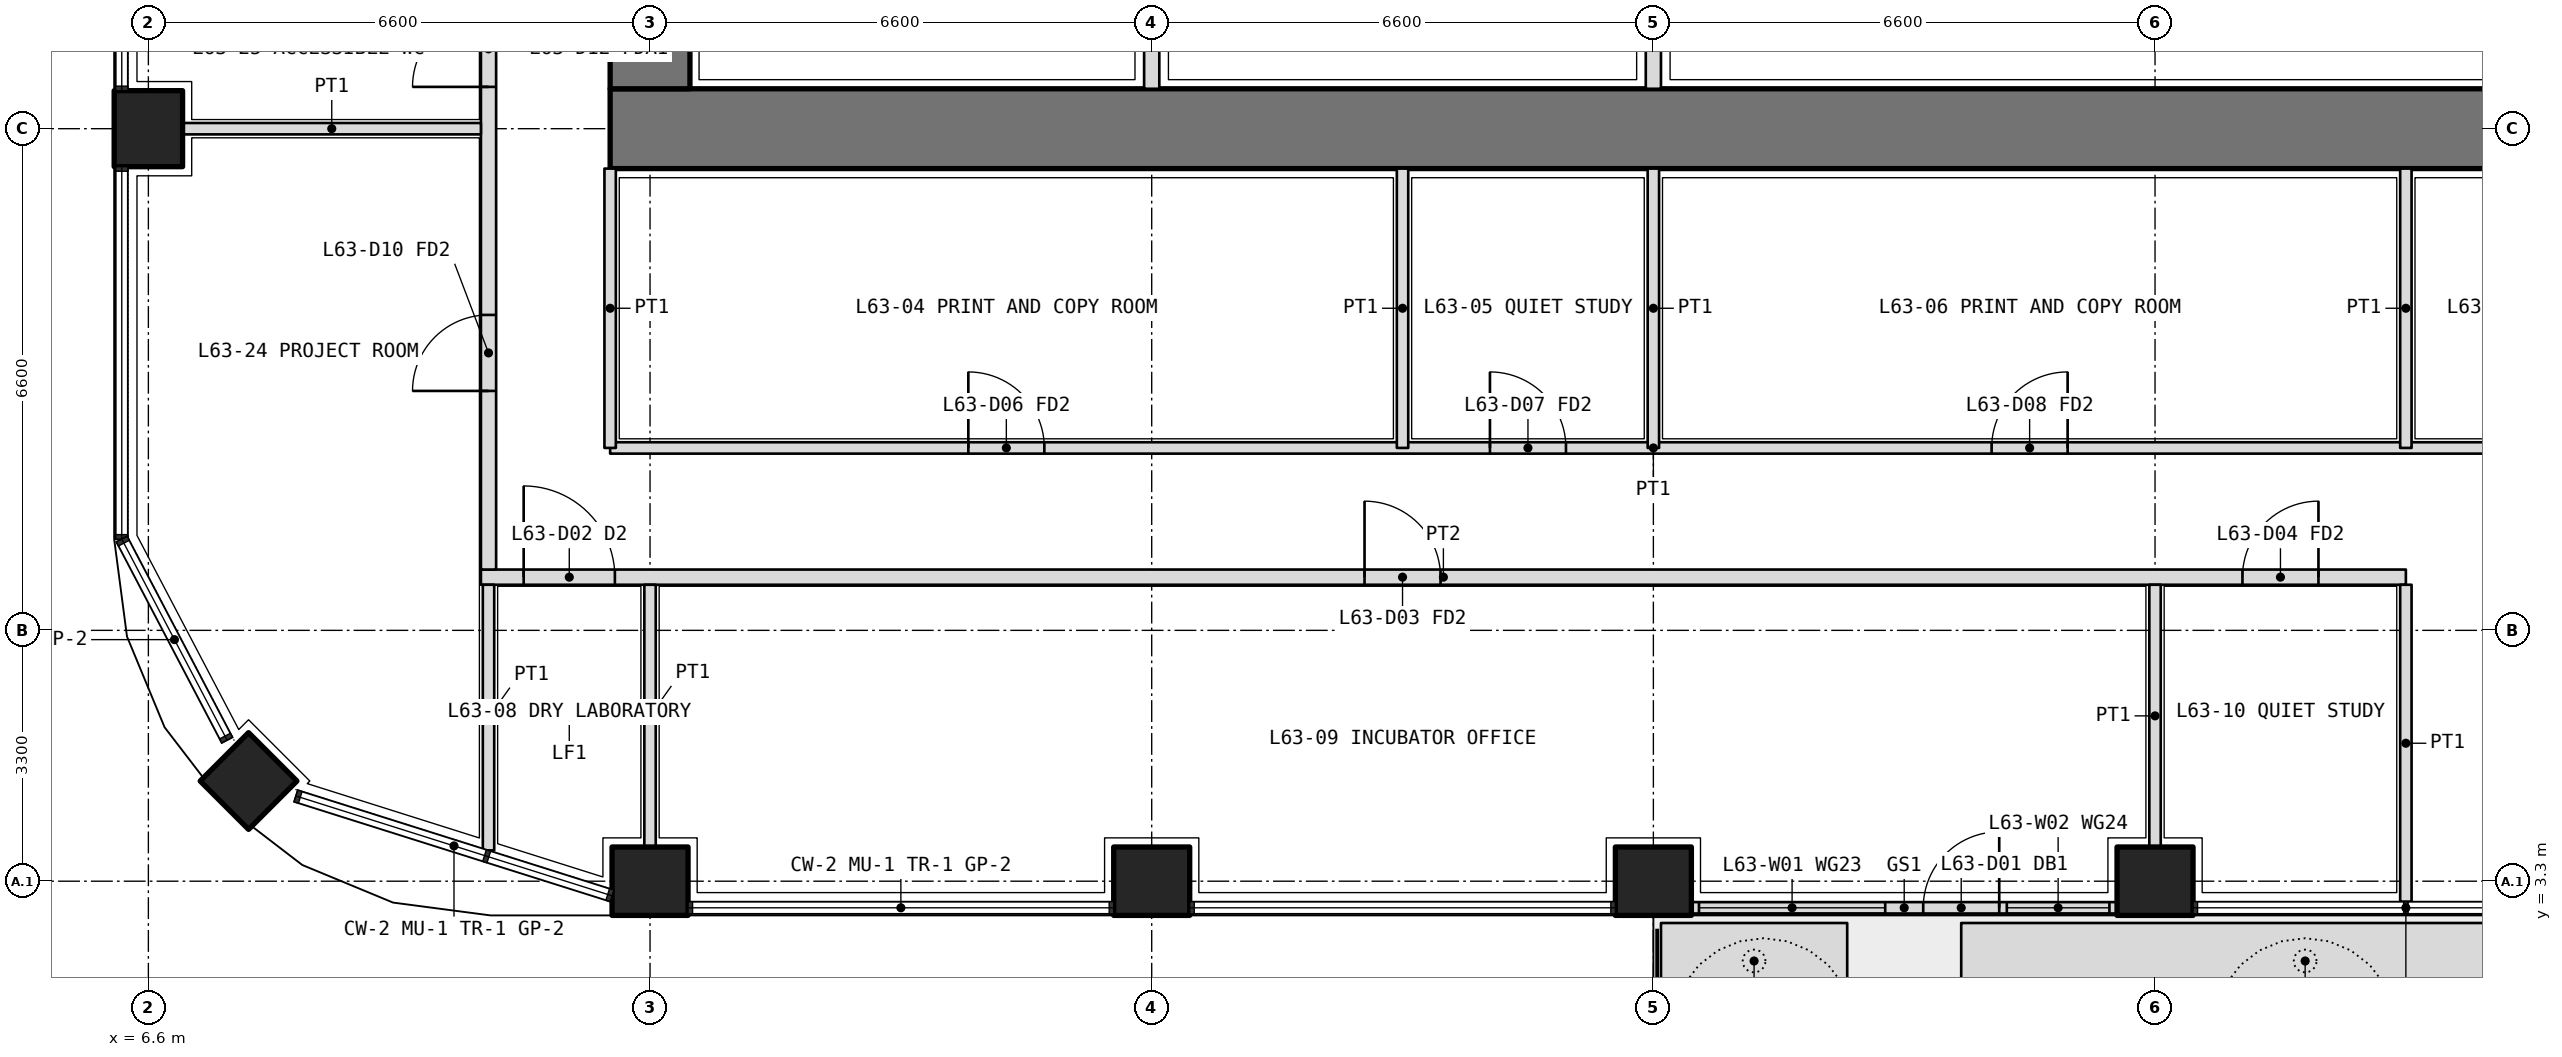
"""IFC4 building model, lengths in metres.
Left out: names, types, materials, properties, quantities, classifications, styles, units other than length and angle.
Written with IfcOpenShell. Run it as: python <this file> out.ifc"""

import sys

from ifc_helpers import new_model, si_unit, direction, frame, frame_2d, origin, origin_2d, place, context, subcontext, project, spatial, polyline, rectangle, outline, extrude, element, fill, save


model = new_model("IFC4")
c1 = context("Model", 3, precision=1e-05, world=origin(), true_north=direction((0.0, 1.0)))
c2 = subcontext(c1, "Body", "Model", "MODEL_VIEW")
j1 = project(units=[si_unit("LENGTHUNIT", "METRE"), si_unit("PLANEANGLEUNIT", "RADIAN")], contexts=[c1])
p1 = place(None, origin())
s1 = spatial("IfcSite", under=j1, at=p1, CompositionType="ELEMENT")
p2 = place(p1, origin())
s2 = spatial("IfcBuilding", under=s1, at=p2, CompositionType="ELEMENT")
p3 = place(p2, frame((0.0, 0.0, 275.4)))
s3 = spatial("IfcBuildingStorey", under=s2, at=p3, CompositionType="ELEMENT", Elevation=275.4)
p4 = place(p3, frame((7.918, 4.618, 0.0), z_axis=(0.0, 0.0, 1.0), x_axis=(0.707106781187, 0.707106781187, 0.0)))
e1 = element("IfcColumn", 1, at=p4, inside=s3, PredefinedType="COLUMN", context=c2, shape_type="SweptSolid", body=[
    extrude(rectangle(XDim=0.9, YDim=0.9, at=origin_2d()), origin(), (0.0, 0.0, 1.0), 4.2),
])
for number, where, z_axis, x_axis in (
    (2, (13.2, 3.3, 0.0), (0.0, 0.0, 1.0), (1.0, 0.0, 0.0)),
    (3, (19.8, 3.3, 0.0), (0.0, 0.0, 1.0), (1.0, 0.0, 0.0)),
    (4, (26.4, 3.3, 0.0), (0.0, 0.0, 1.0), (1.0, 0.0, 0.0)),
    (5, (33.0, 3.3, 0.0), (0.0, 0.0, 1.0), (1.0, 0.0, 0.0)),
    (6, (6.6, 13.2, 0.0), (0.0, 0.0, 1.0), (0.0, 1.0, 0.0)),
):
    element("IfcColumn", number, at=place(p3, frame(where, z_axis=z_axis, x_axis=x_axis)), inside=s3, PredefinedType="COLUMN", context=c2, shape_type="SweptSolid", body=[
        extrude(rectangle(XDim=1.0, YDim=0.9, at=origin_2d()), origin(), (0.0, 0.0, 1.0), 4.2),
    ])
p5 = place(p3, origin())
e7 = element("IfcWall", 7, at=p5, inside=s3, PredefinedType="USERDEFINED", context=c2, shape_type="SweptSolid", body=[
    extrude(outline(polyline([(26.5, 1.75), (28.95, 1.75), (28.95, 2.75), (26.5, 2.75), (26.5, 1.75)]), holes=[polyline([(26.65, 1.9), (28.8, 1.9), (28.8, 2.6), (26.65, 2.6), (26.65, 1.9)])]), origin(), (0.0, 0.0, 1.0), 1.05),
])
p6 = place(p3, origin())
e8 = element("IfcWall", 8, at=p6, inside=s3, PredefinedType="USERDEFINED", context=c2, shape_type="SweptSolid", body=[
    extrude(outline(polyline([(30.45, 1.75), (39.5, 1.75), (39.5, 2.75), (30.45, 2.75), (30.45, 1.75)]), holes=[polyline([(30.6, 1.9), (39.35, 1.9), (39.35, 2.6), (30.6, 2.6), (30.6, 1.9)])]), origin(), (0.0, 0.0, 1.0), 1.05),
])
p7 = place(p3, frame((26.9, 2.95, 0.0), z_axis=(0.0, 0.0, 1.0), x_axis=(1.0, 0.0, 0.0)))
e9 = element("IfcWall", 9, at=p7, inside=s3, PredefinedType="SOLIDWALL", context=c2, shape_type="SweptSolid", body=[
    extrude(rectangle(XDim=5.6, YDim=0.15, at=frame_2d((2.8, 0.0))), origin(), (0.0, 0.0, 1.0), 2.7),
])
p8 = place(p7, frame((3.05, 0.0, 0.0)))
e10 = element("IfcOpeningElement", 10, at=p8, cuts=e9, PredefinedType="OPENING", context=c2, shape_type="SweptSolid", body=[
    extrude(rectangle(XDim=1.0, YDim=2.4, at=frame_2d((0.5, 1.2))), frame((0.0, 0.085, 0.0), z_axis=(0.0, -1.0, 0.0), x_axis=(1.0, 0.0, 0.0)), (0.0, 0.0, 1.0), 0.17),
])
p9 = place(p7, frame((0.1, 0.0, 0.1)))
e11 = element("IfcOpeningElement", 11, at=p9, cuts=e9, PredefinedType="OPENING", context=c2, shape_type="SweptSolid", body=[
    extrude(rectangle(XDim=2.45, YDim=2.3, at=frame_2d((1.225, 1.15))), frame((0.0, 0.085, 0.0), z_axis=(0.0, -1.0, 0.0), x_axis=(1.0, 0.0, 0.0)), (0.0, 0.0, 1.0), 0.17),
])
p10 = place(p7, frame((4.15, 0.0, 0.1)))
e12 = element("IfcOpeningElement", 12, at=p10, cuts=e9, PredefinedType="OPENING", context=c2, shape_type="SweptSolid", body=[
    extrude(rectangle(XDim=1.35, YDim=2.3, at=frame_2d((0.675, 1.15))), frame((0.0, 0.085, 0.0), z_axis=(0.0, -1.0, 0.0), x_axis=(1.0, 0.0, 0.0)), (0.0, 0.0, 1.0), 0.17),
])
p11 = place(p3, frame((12.675, 13.2, 0.0), z_axis=(0.0, 0.0, 1.0), x_axis=(1.0, 0.0, 0.0)))
e13 = element("IfcWall", 13, at=p11, inside=s3, PredefinedType="SHEAR", context=c2, shape_type="SweptSolid", body=[
    extrude(rectangle(XDim=27.45, YDim=1.05, at=frame_2d((13.725, 0.0))), origin(), (0.0, 0.0, 1.0), 4.2),
])
p12 = place(p3, frame((13.2, 32.475, 0.0), z_axis=(0.0, 0.0, 1.0), x_axis=(0.0, -1.0, 0.0)))
e14 = element("IfcWall", 14, at=p12, inside=s3, PredefinedType="SHEAR", context=c2, shape_type="SweptSolid", body=[
    extrude(rectangle(XDim=18.75, YDim=1.05, at=frame_2d((9.375, 0.0))), origin(), (0.0, 0.0, 1.0), 4.2),
])
p13 = place(p12, frame((14.125, 0.0, 0.0)))
e15 = element("IfcOpeningElement", 15, at=p13, cuts=e14, PredefinedType="OPENING", context=c2, shape_type="SweptSolid", body=[
    extrude(rectangle(XDim=1.6, YDim=2.1, at=frame_2d((0.8, 1.05))), frame((0.0, 0.535, 0.0), z_axis=(0.0, -1.0, 0.0), x_axis=(1.0, 0.0, 0.0)), (0.0, 0.0, 1.0), 1.07),
])
p14 = place(p12, frame((3.325, 0.0, 0.0)))
e16 = element("IfcOpeningElement", 16, at=p14, cuts=e14, PredefinedType="OPENING", context=c2, shape_type="SweptSolid", body=[
    extrude(rectangle(XDim=1.6, YDim=2.1, at=frame_2d((0.8, 1.05))), frame((0.0, 0.535, 0.0), z_axis=(0.0, -1.0, 0.0), x_axis=(1.0, 0.0, 0.0)), (0.0, 0.0, 1.0), 1.07),
])
for number, where, z_axis, x_axis in (
    (17, (19.8, 13.725, 0.0), (0.0, 0.0, 1.0), (0.0, 1.0, 0.0)),
    (18, (26.4, 13.725, 0.0), (0.0, 0.0, 1.0), (0.0, 1.0, 0.0)),
):
    element("IfcWall", number, at=place(p3, frame(where, z_axis=z_axis, x_axis=x_axis)), inside=s3, PredefinedType="PARTITIONING", context=c2, shape_type="SweptSolid", body=[
        extrude(rectangle(XDim=1.975, YDim=0.2, at=frame_2d((0.987, 0.0))), origin(), (0.0, 0.0, 1.0), 4.2),
    ])
p15 = place(p3, frame((12.675, 9.0, 0.0), z_axis=(0.0, 0.0, 1.0), x_axis=(1.0, 0.0, 0.0)))
e19 = element("IfcWall", 19, at=p15, inside=s3, PredefinedType="PARTITIONING", context=c2, shape_type="SweptSolid", body=[
    extrude(rectangle(XDim=27.45, YDim=0.15, at=frame_2d((13.725, 0.0))), origin(), (0.0, 0.0, 1.0), 3.0),
])
p16 = place(p15, frame((4.712, 0.0, 0.0)))
e20 = element("IfcOpeningElement", 20, at=p16, cuts=e19, PredefinedType="OPENING", context=c2, shape_type="SweptSolid", body=[
    extrude(rectangle(XDim=1.0, YDim=2.1, at=frame_2d((0.5, 1.05))), frame((0.0, 0.085, 0.0), z_axis=(0.0, -1.0, 0.0), x_axis=(1.0, 0.0, 0.0)), (0.0, 0.0, 1.0), 0.17),
])
p17 = place(p15, frame((11.575, 0.0, 0.0)))
e21 = element("IfcOpeningElement", 21, at=p17, cuts=e19, PredefinedType="OPENING", context=c2, shape_type="SweptSolid", body=[
    extrude(rectangle(XDim=1.0, YDim=2.1, at=frame_2d((0.5, 1.05))), frame((0.0, 0.085, 0.0), z_axis=(0.0, -1.0, 0.0), x_axis=(1.0, 0.0, 0.0)), (0.0, 0.0, 1.0), 0.17),
])
p18 = place(p15, frame((18.175, 0.0, 0.0)))
e22 = element("IfcOpeningElement", 22, at=p18, cuts=e19, PredefinedType="OPENING", context=c2, shape_type="SweptSolid", body=[
    extrude(rectangle(XDim=1.0, YDim=2.1, at=frame_2d((0.5, 1.05))), frame((0.0, 0.085, 0.0), z_axis=(0.0, -1.0, 0.0), x_axis=(1.0, 0.0, 0.0)), (0.0, 0.0, 1.0), 0.17),
])
p19 = place(p15, frame((25.038, 0.0, 0.0)))
e23 = element("IfcOpeningElement", 23, at=p19, cuts=e19, PredefinedType="OPENING", context=c2, shape_type="SweptSolid", body=[
    extrude(rectangle(XDim=1.0, YDim=2.1, at=frame_2d((0.5, 1.05))), frame((0.0, 0.085, 0.0), z_axis=(0.0, -1.0, 0.0), x_axis=(1.0, 0.0, 0.0)), (0.0, 0.0, 1.0), 0.17),
])
p20 = place(p3, frame((12.675, 12.675, 0.0), z_axis=(0.0, 0.0, 1.0), x_axis=(0.0, -1.0, 0.0)))
e24 = element("IfcWall", 24, at=p20, inside=s3, PredefinedType="PARTITIONING", context=c2, shape_type="SweptSolid", body=[
    extrude(rectangle(XDim=3.675, YDim=0.15, at=frame_2d((1.837, 0.0))), origin(), (0.0, 0.0, 1.0), 3.0),
])
p21 = place(p3, frame((23.1, 12.675, 0.0), z_axis=(0.0, 0.0, 1.0), x_axis=(0.0, -1.0, 0.0)))
e25 = element("IfcWall", 25, at=p21, inside=s3, PredefinedType="PARTITIONING", context=c2, shape_type="SweptSolid", body=[
    extrude(rectangle(XDim=3.675, YDim=0.15, at=frame_2d((1.837, 0.0))), origin(), (0.0, 0.0, 1.0), 3.9),
])
p22 = place(p3, frame((26.4, 12.675, 0.0), z_axis=(0.0, 0.0, 1.0), x_axis=(0.0, -1.0, 0.0)))
e26 = element("IfcWall", 26, at=p22, inside=s3, PredefinedType="PARTITIONING", context=c2, shape_type="SweptSolid", body=[
    extrude(rectangle(XDim=3.675, YDim=0.15, at=frame_2d((1.837, 0.0))), origin(), (0.0, 0.0, 1.0), 3.0),
])
p23 = place(p3, frame((36.3, 12.675, 0.0), z_axis=(0.0, 0.0, 1.0), x_axis=(0.0, -1.0, 0.0)))
e27 = element("IfcWall", 27, at=p23, inside=s3, PredefinedType="PARTITIONING", context=c2, shape_type="SweptSolid", body=[
    extrude(rectangle(XDim=3.675, YDim=0.15, at=frame_2d((1.837, 0.0))), origin(), (0.0, 0.0, 1.0), 3.9),
])
p24 = place(p3, frame((10.975, 7.3, 0.0), z_axis=(0.0, 0.0, 1.0), x_axis=(1.0, 0.0, 0.0)))
e28 = element("IfcWall", 28, at=p24, inside=s3, PredefinedType="PARTITIONING", context=c2, shape_type="SweptSolid", body=[
    extrude(rectangle(XDim=25.325, YDim=0.2, at=frame_2d((12.663, 0.0))), origin(), (0.0, 0.0, 1.0), 3.0),
])
p25 = place(p24, frame((0.562, 0.0, 0.0)))
e29 = element("IfcOpeningElement", 29, at=p25, cuts=e28, PredefinedType="OPENING", context=c2, shape_type="SweptSolid", body=[
    extrude(rectangle(XDim=1.2, YDim=2.1, at=frame_2d((0.6, 1.05))), frame((0.0, 0.11, 0.0), z_axis=(0.0, -1.0, 0.0), x_axis=(1.0, 0.0, 0.0)), (0.0, 0.0, 1.0), 0.22),
])
p26 = place(p24, frame((11.625, 0.0, 0.0)))
e30 = element("IfcOpeningElement", 30, at=p26, cuts=e28, PredefinedType="OPENING", context=c2, shape_type="SweptSolid", body=[
    extrude(rectangle(XDim=1.0, YDim=2.1, at=frame_2d((0.5, 1.05))), frame((0.0, 0.11, 0.0), z_axis=(0.0, -1.0, 0.0), x_axis=(1.0, 0.0, 0.0)), (0.0, 0.0, 1.0), 0.22),
])
p27 = place(p24, frame((23.175, 0.0, 0.0)))
e31 = element("IfcOpeningElement", 31, at=p27, cuts=e28, PredefinedType="OPENING", context=c2, shape_type="SweptSolid", body=[
    extrude(rectangle(XDim=1.0, YDim=2.1, at=frame_2d((0.5, 1.05))), frame((0.0, 0.11, 0.0), z_axis=(0.0, -1.0, 0.0), x_axis=(1.0, 0.0, 0.0)), (0.0, 0.0, 1.0), 0.22),
])
p28 = place(p3, frame((11.075, 7.4, 0.0), z_axis=(0.0, 0.0, 1.0), x_axis=(0.0, 1.0, 0.0)))
e32 = element("IfcWall", 32, at=p28, inside=s3, PredefinedType="PARTITIONING", context=c2, shape_type="SweptSolid", body=[
    extrude(rectangle(XDim=31.4, YDim=0.2, at=frame_2d((15.7, 0.0))), origin(), (0.0, 0.0, 1.0), 3.0),
])
p29 = place(p28, frame((2.35, 0.0, 0.0)))
e33 = element("IfcOpeningElement", 33, at=p29, cuts=e32, PredefinedType="OPENING", context=c2, shape_type="SweptSolid", body=[
    extrude(rectangle(XDim=1.0, YDim=2.1, at=frame_2d((0.5, 1.05))), frame((0.0, 0.11, 0.0), z_axis=(0.0, -1.0, 0.0), x_axis=(1.0, 0.0, 0.0)), (0.0, 0.0, 1.0), 0.22),
])
p30 = place(p28, frame((6.35, 0.0, 0.0)))
e34 = element("IfcOpeningElement", 34, at=p30, cuts=e32, PredefinedType="OPENING", context=c2, shape_type="SweptSolid", body=[
    extrude(rectangle(XDim=1.0, YDim=2.1, at=frame_2d((0.5, 1.05))), frame((0.0, 0.11, 0.0), z_axis=(0.0, -1.0, 0.0), x_axis=(1.0, 0.0, 0.0)), (0.0, 0.0, 1.0), 0.22),
])
p31 = place(p28, frame((9.45, 0.0, 0.0)))
e35 = element("IfcOpeningElement", 35, at=p31, cuts=e32, PredefinedType="OPENING", context=c2, shape_type="SweptSolid", body=[
    extrude(rectangle(XDim=0.9, YDim=2.1, at=frame_2d((0.45, 1.05))), frame((0.0, 0.11, 0.0), z_axis=(0.0, -1.0, 0.0), x_axis=(1.0, 0.0, 0.0)), (0.0, 0.0, 1.0), 0.22),
])
p32 = place(p28, frame((13.35, 0.0, 0.0)))
e36 = element("IfcOpeningElement", 36, at=p32, cuts=e32, PredefinedType="OPENING", context=c2, shape_type="SweptSolid", body=[
    extrude(rectangle(XDim=0.9, YDim=2.1, at=frame_2d((0.45, 1.05))), frame((0.0, 0.11, 0.0), z_axis=(0.0, -1.0, 0.0), x_axis=(1.0, 0.0, 0.0)), (0.0, 0.0, 1.0), 0.22),
])
p33 = place(p28, frame((23.1, 0.0, 0.0)))
e37 = element("IfcOpeningElement", 37, at=p33, cuts=e32, PredefinedType="OPENING", context=c2, shape_type="SweptSolid", body=[
    extrude(rectangle(XDim=1.0, YDim=2.1, at=frame_2d((0.5, 1.05))), frame((0.0, 0.11, 0.0), z_axis=(0.0, -1.0, 0.0), x_axis=(1.0, 0.0, 0.0)), (0.0, 0.0, 1.0), 0.22),
])
p34 = place(p3, frame((11.075, 3.705, 0.0), z_axis=(0.0, 0.0, 1.0), x_axis=(0.0, 1.0, 0.0)))
e38 = element("IfcWall", 38, at=p34, inside=s3, PredefinedType="PARTITIONING", context=c2, shape_type="SweptSolid", body=[
    extrude(rectangle(XDim=3.495, YDim=0.15, at=frame_2d((1.748, 0.0))), origin(), (0.0, 0.0, 1.0), 2.7),
])
for number, where, z_axis, x_axis in (
    (39, (13.2, 3.75, 0.0), (0.0, 0.0, 1.0), (0.0, 1.0, 0.0)),
    (40, (33.0, 3.75, 0.0), (0.0, 0.0, 1.0), (0.0, 1.0, 0.0)),
):
    element("IfcWall", number, at=place(p3, frame(where, z_axis=z_axis, x_axis=x_axis)), inside=s3, PredefinedType="PARTITIONING", context=c2, shape_type="SweptSolid", body=[
        extrude(rectangle(XDim=3.45, YDim=0.15, at=frame_2d((1.725, 0.0))), origin(), (0.0, 0.0, 1.0), 3.0),
    ])
p35 = place(p3, frame((36.3, 3.03, 0.0), z_axis=(0.0, 0.0, 1.0), x_axis=(0.0, 1.0, 0.0)))
e41 = element("IfcWall", 41, at=p35, inside=s3, PredefinedType="PARTITIONING", context=c2, shape_type="SweptSolid", body=[
    extrude(rectangle(XDim=4.17, YDim=0.15, at=frame_2d((2.085, 0.0))), origin(), (0.0, 0.0, 1.0), 2.7),
])
p36 = place(p3, frame((7.05, 13.2, 0.0), z_axis=(0.0, 0.0, 1.0), x_axis=(1.0, 0.0, 0.0)))
e42 = element("IfcWall", 42, at=p36, inside=s3, PredefinedType="PARTITIONING", context=c2, shape_type="SweptSolid", body=[
    extrude(rectangle(XDim=3.925, YDim=0.15, at=frame_2d((1.962, 0.0))), origin(), (0.0, 0.0, 1.0), 3.0),
])
p37 = place(p8, origin())
e43 = element("IfcDoor", 43, at=p37, inside=s3, OperationType="SINGLE_SWING_RIGHT", PredefinedType="DOOR", context=c2, shape_type="SweptSolid", body=[
    extrude(rectangle(XDim=1.0, YDim=2.4, at=frame_2d((0.5, 1.2))), frame((0.0, 0.025, 0.0), z_axis=(0.0, -1.0, 0.0), x_axis=(1.0, 0.0, 0.0)), (0.0, 0.0, 1.0), 0.05),
])
fill(e10, e43)
p38 = place(p9, origin())
e44 = element("IfcWindow", 44, at=p38, inside=s3, PartitioningType="SINGLE_PANEL", PredefinedType="WINDOW", context=c2, shape_type="SweptSolid", body=[
    extrude(rectangle(XDim=2.45, YDim=2.3, at=frame_2d((1.225, 1.15))), frame((0.0, 0.03, 0.0), z_axis=(0.0, -1.0, 0.0), x_axis=(1.0, 0.0, 0.0)), (0.0, 0.0, 1.0), 0.06),
])
fill(e11, e44)
p39 = place(p10, origin())
e45 = element("IfcWindow", 45, at=p39, inside=s3, PartitioningType="SINGLE_PANEL", PredefinedType="WINDOW", context=c2, shape_type="SweptSolid", body=[
    extrude(rectangle(XDim=1.35, YDim=2.3, at=frame_2d((0.675, 1.15))), frame((0.0, 0.03, 0.0), z_axis=(0.0, -1.0, 0.0), x_axis=(1.0, 0.0, 0.0)), (0.0, 0.0, 1.0), 0.06),
])
fill(e12, e45)
p40 = place(p16, origin())
e46 = element("IfcDoor", 46, at=p40, inside=s3, OperationType="SINGLE_SWING_LEFT", PredefinedType="DOOR", context=c2, shape_type="SweptSolid", body=[
    extrude(rectangle(XDim=1.0, YDim=2.1, at=frame_2d((0.5, 1.05))), frame((0.0, 0.025, 0.0), z_axis=(0.0, -1.0, 0.0), x_axis=(1.0, 0.0, 0.0)), (0.0, 0.0, 1.0), 0.05),
])
fill(e20, e46)
p41 = place(p17, origin())
e47 = element("IfcDoor", 47, at=p41, inside=s3, OperationType="SINGLE_SWING_LEFT", PredefinedType="DOOR", context=c2, shape_type="SweptSolid", body=[
    extrude(rectangle(XDim=1.0, YDim=2.1, at=frame_2d((0.5, 1.05))), frame((0.0, 0.025, 0.0), z_axis=(0.0, -1.0, 0.0), x_axis=(1.0, 0.0, 0.0)), (0.0, 0.0, 1.0), 0.05),
])
fill(e21, e47)
p42 = place(p18, origin())
e48 = element("IfcDoor", 48, at=p42, inside=s3, OperationType="SINGLE_SWING_RIGHT", PredefinedType="DOOR", context=c2, shape_type="SweptSolid", body=[
    extrude(rectangle(XDim=1.0, YDim=2.1, at=frame_2d((0.5, 1.05))), frame((0.0, 0.025, 0.0), z_axis=(0.0, -1.0, 0.0), x_axis=(1.0, 0.0, 0.0)), (0.0, 0.0, 1.0), 0.05),
])
fill(e22, e48)
p43 = place(p25, origin())
e49 = element("IfcDoor", 49, at=p43, inside=s3, OperationType="DOUBLE_DOOR_SINGLE_SWING", PredefinedType="DOOR", context=c2, shape_type="SweptSolid", body=[
    extrude(rectangle(XDim=1.2, YDim=2.1, at=frame_2d((0.6, 1.05))), frame((0.0, 0.025, 0.0), z_axis=(0.0, -1.0, 0.0), x_axis=(1.0, 0.0, 0.0)), (0.0, 0.0, 1.0), 0.05),
])
fill(e29, e49)
p44 = place(p26, origin())
e50 = element("IfcDoor", 50, at=p44, inside=s3, OperationType="SINGLE_SWING_LEFT", PredefinedType="DOOR", context=c2, shape_type="SweptSolid", body=[
    extrude(rectangle(XDim=1.0, YDim=2.1, at=frame_2d((0.5, 1.05))), frame((0.0, 0.025, 0.0), z_axis=(0.0, -1.0, 0.0), x_axis=(1.0, 0.0, 0.0)), (0.0, 0.0, 1.0), 0.05),
])
fill(e30, e50)
p45 = place(p27, origin())
e51 = element("IfcDoor", 51, at=p45, inside=s3, OperationType="SINGLE_SWING_RIGHT", PredefinedType="DOOR", context=c2, shape_type="SweptSolid", body=[
    extrude(rectangle(XDim=1.0, YDim=2.1, at=frame_2d((0.5, 1.05))), frame((0.0, 0.025, 0.0), z_axis=(0.0, -1.0, 0.0), x_axis=(1.0, 0.0, 0.0)), (0.0, 0.0, 1.0), 0.05),
])
fill(e31, e51)
p46 = place(p29, origin())
e52 = element("IfcDoor", 52, at=p46, inside=s3, OperationType="SINGLE_SWING_LEFT", PredefinedType="DOOR", context=c2, shape_type="SweptSolid", body=[
    extrude(rectangle(XDim=1.0, YDim=2.1, at=frame_2d((0.5, 1.05))), frame((0.0, 0.025, 0.0), z_axis=(0.0, -1.0, 0.0), x_axis=(1.0, 0.0, 0.0)), (0.0, 0.0, 1.0), 0.05),
])
fill(e33, e52)
p47 = place(p30, origin())
e53 = element("IfcDoor", 53, at=p47, inside=s3, OperationType="SINGLE_SWING_LEFT", PredefinedType="DOOR", context=c2, shape_type="SweptSolid", body=[
    extrude(rectangle(XDim=1.0, YDim=2.1, at=frame_2d((0.5, 1.05))), frame((0.0, 0.025, 0.0), z_axis=(0.0, -1.0, 0.0), x_axis=(1.0, 0.0, 0.0)), (0.0, 0.0, 1.0), 0.05),
])
fill(e34, e53)
save(model, sys.argv[1])
